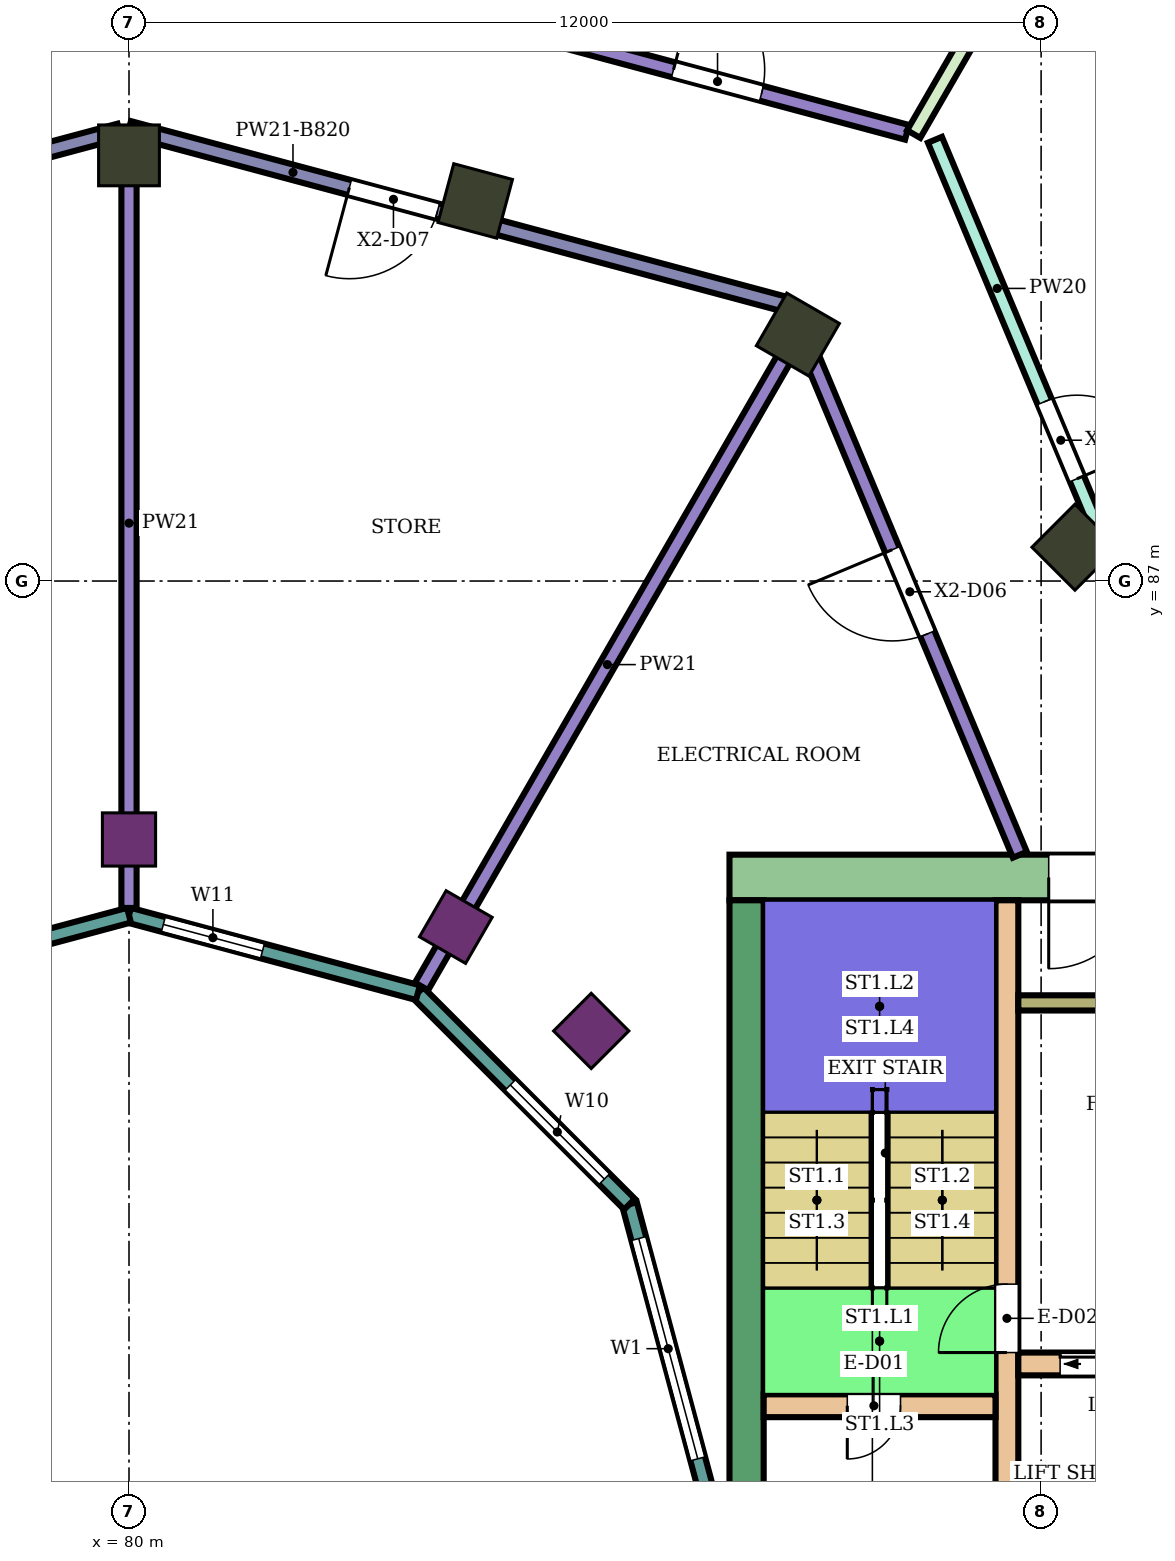
"""IFC4 building model, lengths in metres.
Left out: names, types, materials, properties, quantities, classifications, styles, units other than length and angle.
Written with IfcOpenShell. Run it as: python <this file> out.ifc"""

import sys

from ifc_helpers import new_model, si_unit, direction, frame, frame_2d, origin, origin_2d, place, context, subcontext, project, spatial, rectangle, extrude, element, fill, save


model = new_model("IFC4")
c1 = context("Model", 3, precision=1e-05, world=origin(), true_north=direction((0.0, 1.0)))
c2 = subcontext(c1, "Body", "Model", "MODEL_VIEW")
j1 = project(units=[si_unit("LENGTHUNIT", "METRE"), si_unit("PLANEANGLEUNIT", "RADIAN")], contexts=[c1])
p1 = place(None, origin())
s1 = spatial("IfcSite", under=j1, at=p1, CompositionType="ELEMENT")
p2 = place(p1, origin())
s2 = spatial("IfcBuilding", under=s1, at=p2, CompositionType="ELEMENT")
p3 = place(p2, frame((0.0, 0.0, 206.9)))
s3 = spatial("IfcBuildingStorey", under=s2, at=p3, CompositionType="ELEMENT", Elevation=206.9)
for number, where, z_axis, x_axis in (
    (1, (92.445, 87.445, 0.0), (0.0, 0.0, 1.0), (0.707, 0.707, 0.0)),
    (2, (88.8, 90.242, 0.0), (0.0, 0.0, 1.0), (0.5, 0.866, 0.0)),
    (3, (84.555, 92.0, 0.0), (0.0, 0.0, 1.0), (0.259, 0.966, 0.0)),
    (4, (80.0, 92.6, 0.0), (0.0, 0.0, 1.0), (0.0, 1.0, 0.0)),
):
    element("IfcColumn", number, at=place(p3, frame(where, z_axis=z_axis, x_axis=x_axis)), inside=s3, PredefinedType="COLUMN", context=c2, shape_type="SweptSolid", body=[
        extrude(rectangle(XDim=0.8, YDim=0.8, at=origin_2d()), origin(), (0.0, 0.0, 1.0), 5.6),
    ])
for number, where, z_axis, x_axis in (
    (5, (86.081, 81.081, 0.0), (0.0, 0.0, 1.0), (0.707, 0.707, 0.0)),
    (6, (84.3, 82.448, 0.0), (0.0, 0.0, 1.0), (0.5, 0.866, 0.0)),
    (7, (80.0, 83.6, 0.0), (0.0, 0.0, 1.0), (0.0, 1.0, 0.0)),
):
    element("IfcColumn", number, at=place(p3, frame(where, z_axis=z_axis, x_axis=x_axis)), inside=s3, PredefinedType="COLUMN", context=c2, shape_type="SweptSolid", body=[
        extrude(rectangle(XDim=0.7, YDim=0.7, at=origin_2d()), origin(), (0.0, 0.0, 1.0), 5.6),
    ])
p4 = place(p3, frame((87.9, 83.1, 0.0), z_axis=(0.0, 0.0, 1.0), x_axis=(1.0, 0.0, 0.0)))
e8 = element("IfcWall", 8, at=p4, inside=s3, PredefinedType="SHEAR", context=c2, shape_type="SweptSolid", body=[
    extrude(rectangle(XDim=14.9, YDim=0.6, at=frame_2d((7.45, 0.0))), origin(), (0.0, 0.0, 1.0), 5.28),
])
p5 = place(p4, frame((4.2, 0.0, 0.0)))
e9 = element("IfcOpeningElement", 9, at=p5, cuts=e8, PredefinedType="OPENING", context=c2, shape_type="SweptSolid", body=[
    extrude(rectangle(XDim=2.4, YDim=2.4, at=frame_2d((1.2, 1.2))), frame((0.0, 0.31, 0.0), z_axis=(0.0, -1.0, 0.0), x_axis=(1.0, 0.0, 0.0)), (0.0, 0.0, 1.0), 0.62),
])
p6 = place(p3, frame((88.125, 75.0, 0.0), z_axis=(0.0, 0.0, 1.0), x_axis=(0.0, 1.0, 0.0)))
e10 = element("IfcWall", 10, at=p6, inside=s3, PredefinedType="SHEAR", context=c2, shape_type="SweptSolid", body=[
    extrude(rectangle(XDim=7.8, YDim=0.45, at=frame_2d((3.9, 0.0))), origin(), (0.0, 0.0, 1.0), 5.28),
])
p7 = place(p3, frame((91.55, 75.0, 0.0), z_axis=(0.0, 0.0, 1.0), x_axis=(0.0, 1.0, 0.0)))
e11 = element("IfcWall", 11, at=p7, inside=s3, PredefinedType="SHEAR", context=c2, shape_type="SweptSolid", body=[
    extrude(rectangle(XDim=7.8, YDim=0.3, at=frame_2d((3.9, 0.0))), origin(), (0.0, 0.0, 1.0), 5.28),
])
p8 = place(p7, frame((1.85, 0.0, 0.0)))
e12 = element("IfcOpeningElement", 12, at=p8, cuts=e11, PredefinedType="OPENING", context=c2, shape_type="SweptSolid", body=[
    extrude(rectangle(XDim=0.9, YDim=2.1, at=frame_2d((0.45, 1.05))), frame((0.0, 0.16, 0.0), z_axis=(0.0, -1.0, 0.0), x_axis=(1.0, 0.0, 0.0)), (0.0, 0.0, 1.0), 0.32),
])
p9 = place(p3, frame((88.35, 76.15, 0.0), z_axis=(0.0, 0.0, 1.0), x_axis=(1.0, 0.0, 0.0)))
e13 = element("IfcWall", 13, at=p9, inside=s3, PredefinedType="SHEAR", context=c2, shape_type="SweptSolid", body=[
    extrude(rectangle(XDim=3.05, YDim=0.3, at=frame_2d((1.525, 0.0))), origin(), (0.0, 0.0, 1.0), 5.28),
])
p10 = place(p9, frame((1.1, 0.0, 0.0)))
e14 = element("IfcOpeningElement", 14, at=p10, cuts=e13, PredefinedType="OPENING", context=c2, shape_type="SweptSolid", body=[
    extrude(rectangle(XDim=0.7, YDim=2.0, at=frame_2d((0.35, 1.0))), frame((0.0, 0.16, 0.0), z_axis=(0.0, -1.0, 0.0), x_axis=(1.0, 0.0, 0.0)), (0.0, 0.0, 1.0), 0.32),
])
p11 = place(p3, frame((91.7, 76.7, 0.0), z_axis=(0.0, 0.0, 1.0), x_axis=(1.0, 0.0, 0.0)))
e15 = element("IfcWall", 15, at=p11, inside=s3, PredefinedType="SHEAR", context=c2, shape_type="SweptSolid", body=[
    extrude(rectangle(XDim=11.1, YDim=0.3, at=frame_2d((5.55, 0.0))), origin(), (0.0, 0.0, 1.0), 5.28),
])
p12 = place(p11, frame((0.55, 0.0, 0.0)))
e16 = element("IfcOpeningElement", 16, at=p12, cuts=e15, PredefinedType="OPENING", context=c2, shape_type="SweptSolid", body=[
    extrude(rectangle(XDim=1.1, YDim=2.1, at=frame_2d((0.55, 1.05))), frame((0.0, 0.16, 0.0), z_axis=(0.0, -1.0, 0.0), x_axis=(1.0, 0.0, 0.0)), (0.0, 0.0, 1.0), 0.32),
])
p13 = place(p11, frame((3.0, 0.0, 0.0)))
e17 = element("IfcOpeningElement", 17, at=p13, cuts=e15, PredefinedType="OPENING", context=c2, shape_type="SweptSolid", body=[
    extrude(rectangle(XDim=1.2, YDim=2.1, at=frame_2d((0.6, 1.05))), frame((0.0, 0.16, 0.0), z_axis=(0.0, -1.0, 0.0), x_axis=(1.0, 0.0, 0.0)), (0.0, 0.0, 1.0), 0.32),
])
p14 = place(p11, frame((5.5, 0.0, 0.0)))
e18 = element("IfcOpeningElement", 18, at=p14, cuts=e15, PredefinedType="OPENING", context=c2, shape_type="SweptSolid", body=[
    extrude(rectangle(XDim=1.2, YDim=2.1, at=frame_2d((0.6, 1.05))), frame((0.0, 0.16, 0.0), z_axis=(0.0, -1.0, 0.0), x_axis=(1.0, 0.0, 0.0)), (0.0, 0.0, 1.0), 0.32),
])
p15 = place(p11, frame((7.95, 0.0, 0.0)))
e19 = element("IfcOpeningElement", 19, at=p15, cuts=e15, PredefinedType="OPENING", context=c2, shape_type="SweptSolid", body=[
    extrude(rectangle(XDim=0.9, YDim=2.1, at=frame_2d((0.45, 1.05))), frame((0.0, 0.16, 0.0), z_axis=(0.0, -1.0, 0.0), x_axis=(1.0, 0.0, 0.0)), (0.0, 0.0, 1.0), 0.32),
])
p16 = place(p11, frame((9.75, 0.0, 0.0)))
e20 = element("IfcOpeningElement", 20, at=p16, cuts=e15, PredefinedType="OPENING", context=c2, shape_type="SweptSolid", body=[
    extrude(rectangle(XDim=0.9, YDim=2.1, at=frame_2d((0.45, 1.05))), frame((0.0, 0.16, 0.0), z_axis=(0.0, -1.0, 0.0), x_axis=(1.0, 0.0, 0.0)), (0.0, 0.0, 1.0), 0.32),
])
p17 = place(p3, frame((91.7, 81.45, 0.0), z_axis=(0.0, 0.0, 1.0), x_axis=(1.0, 0.0, 0.0)))
e21 = element("IfcWall", 21, at=p17, inside=s3, PredefinedType="SHEAR", context=c2, shape_type="SweptSolid", body=[
    extrude(rectangle(XDim=4.35, YDim=0.2, at=frame_2d((2.175, 0.0))), origin(), (0.0, 0.0, 1.0), 5.28),
])
p18 = place(p3, frame((87.604, 75.0, 0.0), z_axis=(0.0, 0.0, 1.0), x_axis=(-0.258789828301, 0.965933654434, 0.0)))
e22 = element("IfcWall", 22, at=p18, inside=s3, PredefinedType="NOTDEFINED", context=c2, shape_type="SweptSolid", body=[
    extrude(rectangle(XDim=3.936, YDim=0.2, at=frame_2d((1.968, 0.0))), origin(), (0.0, 0.0, 1.0), 5.6),
])
p19 = place(p18, frame((0.468, 0.0, 0.9)))
e23 = element("IfcOpeningElement", 23, at=p19, cuts=e22, PredefinedType="OPENING", context=c2, shape_type="SweptSolid", body=[
    extrude(rectangle(XDim=3.0, YDim=2.3, at=frame_2d((1.5, 1.15))), frame((0.0, 0.11, 0.0), z_axis=(0.0, -1.0, 0.0), x_axis=(1.0, 0.0, 0.0)), (0.0, 0.0, 1.0), 0.22),
])
p20 = place(p3, frame((86.585, 78.802, 0.0), z_axis=(0.0, 0.0, 1.0), x_axis=(-0.707106781187, 0.707106781187, 0.0)))
e24 = element("IfcWall", 24, at=p20, inside=s3, PredefinedType="NOTDEFINED", context=c2, shape_type="SweptSolid", body=[
    extrude(rectangle(XDim=3.936, YDim=0.2, at=frame_2d((1.968, 0.0))), origin(), (0.0, 0.0, 1.0), 5.6),
])
p21 = place(p20, frame((0.468, 0.0, 0.9)))
e25 = element("IfcOpeningElement", 25, at=p21, cuts=e24, PredefinedType="OPENING", context=c2, shape_type="SweptSolid", body=[
    extrude(rectangle(XDim=1.75, YDim=2.3, at=frame_2d((0.875, 1.15))), frame((0.0, 0.11, 0.0), z_axis=(0.0, -1.0, 0.0), x_axis=(1.0, 0.0, 0.0)), (0.0, 0.0, 1.0), 0.22),
])
p22 = place(p3, frame((83.802, 81.585, 0.0), z_axis=(0.0, 0.0, 1.0), x_axis=(-0.965933654434, 0.258789828301, 0.0)))
e26 = element("IfcWall", 26, at=p22, inside=s3, PredefinedType="NOTDEFINED", context=c2, shape_type="SweptSolid", body=[
    extrude(rectangle(XDim=3.936, YDim=0.2, at=frame_2d((1.968, 0.0))), origin(), (0.0, 0.0, 1.0), 5.6),
])
p23 = place(p22, frame((2.118, 0.0, 0.9)))
e27 = element("IfcOpeningElement", 27, at=p23, cuts=e26, PredefinedType="OPENING", context=c2, shape_type="SweptSolid", body=[
    extrude(rectangle(XDim=1.35, YDim=2.3, at=frame_2d((0.675, 1.15))), frame((0.0, 0.11, 0.0), z_axis=(0.0, -1.0, 0.0), x_axis=(1.0, 0.0, 0.0)), (0.0, 0.0, 1.0), 0.22),
])
p24 = place(p3, frame((80.0, 82.604, 0.0), z_axis=(0.0, 0.0, 1.0), x_axis=(-0.965933654434, -0.258789828301, 0.0)))
e28 = element("IfcWall", 28, at=p24, inside=s3, PredefinedType="NOTDEFINED", context=c2, shape_type="SweptSolid", body=[
    extrude(rectangle(XDim=3.936, YDim=0.2, at=frame_2d((1.968, 0.0))), origin(), (0.0, 0.0, 1.0), 5.6),
])
p25 = place(p24, frame((2.118, 0.0, 0.9)))
e29 = element("IfcOpeningElement", 29, at=p25, cuts=e28, PredefinedType="OPENING", context=c2, shape_type="SweptSolid", body=[
    extrude(rectangle(XDim=1.35, YDim=2.3, at=frame_2d((0.675, 1.15))), frame((0.0, 0.11, 0.0), z_axis=(0.0, -1.0, 0.0), x_axis=(1.0, 0.0, 0.0)), (0.0, 0.0, 1.0), 0.22),
])
p26 = place(p3, frame((69.397, 92.805, 0.0), z_axis=(0.0, 0.0, 1.0), x_axis=(0.965949547217, 0.258730501163, 0.0)))
e30 = element("IfcWall", 30, at=p26, inside=s3, PredefinedType="PARTITIONING", context=c2, shape_type="SweptSolid", body=[
    extrude(rectangle(XDim=10.927, YDim=0.2, at=frame_2d((5.463, 0.0))), origin(), (0.0, 0.0, 1.0), 5.15),
])
p27 = place(p26, frame((5.023, 0.0, 0.0)))
e31 = element("IfcOpeningElement", 31, at=p27, cuts=e30, PredefinedType="OPENING", context=c2, shape_type="SweptSolid", body=[
    extrude(rectangle(XDim=1.2, YDim=2.4, at=frame_2d((0.6, 1.2))), frame((0.0, 0.11, 0.0), z_axis=(0.0, -1.0, 0.0), x_axis=(1.0, 0.0, 0.0)), (0.0, 0.0, 1.0), 0.22),
])
p28 = place(p3, frame((71.303, 90.624, 0.0), z_axis=(0.0, 0.0, 1.0), x_axis=(0.965935648904, 0.258782383822, 0.0)))
e32 = element("IfcWall", 32, at=p28, inside=s3, PredefinedType="PARTITIONING", context=c2, shape_type="SweptSolid", body=[
    extrude(rectangle(XDim=8.874, YDim=0.2, at=frame_2d((4.437, 0.0))), origin(), (0.0, 0.0, 1.0), 4.78),
])
p29 = place(p28, frame((4.802, 0.0, 0.0)))
e33 = element("IfcOpeningElement", 33, at=p29, cuts=e32, PredefinedType="OPENING", context=c2, shape_type="SweptSolid", body=[
    extrude(rectangle(XDim=1.2, YDim=2.4, at=frame_2d((0.6, 1.2))), frame((0.0, 0.11, 0.0), z_axis=(0.0, -1.0, 0.0), x_axis=(1.0, 0.0, 0.0)), (0.0, 0.0, 1.0), 0.22),
])
p30 = place(p3, frame((80.0, 82.699, 0.0), z_axis=(0.0, 0.0, 1.0), x_axis=(0.0, 1.0, 0.0)))
e34 = element("IfcWall", 34, at=p30, inside=s3, PredefinedType="PARTITIONING", context=c2, shape_type="SweptSolid", body=[
    extrude(rectangle(XDim=10.125, YDim=0.2, at=frame_2d((5.062, 0.0))), origin(), (0.0, 0.0, 1.0), 5.15),
])
p31 = place(p3, frame((80.0, 92.954, 0.0), z_axis=(0.0, 0.0, 1.0), x_axis=(0.965932194462, -0.258795277586, 0.0)))
e35 = element("IfcWall", 35, at=p31, inside=s3, PredefinedType="PARTITIONING", context=c2, shape_type="SweptSolid", body=[
    extrude(rectangle(XDim=8.934, YDim=0.2, at=frame_2d((4.467, 0.0))), origin(), (0.0, 0.0, 1.0), 4.78),
])
p32 = place(p31, frame((3.002, 0.0, 0.0)))
e36 = element("IfcOpeningElement", 36, at=p32, cuts=e35, PredefinedType="OPENING", context=c2, shape_type="SweptSolid", body=[
    extrude(rectangle(XDim=1.2, YDim=2.4, at=frame_2d((0.6, 1.2))), frame((0.0, 0.11, 0.0), z_axis=(0.0, -1.0, 0.0), x_axis=(1.0, 0.0, 0.0)), (0.0, 0.0, 1.0), 0.22),
])
p33 = place(p3, frame((80.0, 95.646, 0.0), z_axis=(0.0, 0.0, 1.0), x_axis=(0.965926044247, -0.258818231672, 0.0)))
e37 = element("IfcWall", 37, at=p33, inside=s3, PredefinedType="PARTITIONING", context=c2, shape_type="SweptSolid", body=[
    extrude(rectangle(XDim=10.597, YDim=0.2, at=frame_2d((5.298, 0.0))), origin(), (0.0, 0.0, 1.0), 5.15),
])
p34 = place(p33, frame((7.416, 0.0, 0.0)))
e38 = element("IfcOpeningElement", 38, at=p34, cuts=e37, PredefinedType="OPENING", context=c2, shape_type="SweptSolid", body=[
    extrude(rectangle(XDim=1.2, YDim=2.4, at=frame_2d((0.6, 1.2))), frame((0.0, 0.11, 0.0), z_axis=(0.0, -1.0, 0.0), x_axis=(1.0, 0.0, 0.0)), (0.0, 0.0, 1.0), 0.22),
])
p35 = place(p3, frame((83.849, 81.667, 0.0), z_axis=(0.0, 0.0, 1.0), x_axis=(0.500043783105, 0.866000124121, 0.0)))
e39 = element("IfcWall", 39, at=p35, inside=s3, PredefinedType="PARTITIONING", context=c2, shape_type="SweptSolid", body=[
    extrude(rectangle(XDim=9.777, YDim=0.2, at=frame_2d((4.889, 0.0))), origin(), (0.0, 0.0, 1.0), 5.15),
])
p36 = place(p3, frame((88.697, 90.624, 0.0), z_axis=(0.0, 0.0, 1.0), x_axis=(0.386027055918, -0.922487459047, 0.0)))
e40 = element("IfcWall", 40, at=p36, inside=s3, PredefinedType="PARTITIONING", context=c2, shape_type="SweptSolid", body=[
    extrude(rectangle(XDim=7.832, YDim=0.2, at=frame_2d((3.916, 0.0))), origin(), (0.0, 0.0, 1.0), 5.15),
])
p37 = place(p36, frame((3.482, 0.0, 0.0)))
e41 = element("IfcOpeningElement", 41, at=p37, cuts=e40, PredefinedType="OPENING", context=c2, shape_type="SweptSolid", body=[
    extrude(rectangle(XDim=1.2, YDim=2.4, at=frame_2d((0.6, 1.2))), frame((0.0, 0.11, 0.0), z_axis=(0.0, -1.0, 0.0), x_axis=(1.0, 0.0, 0.0)), (0.0, 0.0, 1.0), 0.22),
])
p38 = place(p3, frame((90.323, 92.88, 0.0), z_axis=(0.0, 0.0, 1.0), x_axis=(0.500028816268, 0.866008766065, 0.0)))
e42 = element("IfcWall", 42, at=p38, inside=s3, PredefinedType="PARTITIONING", context=c2, shape_type="SweptSolid", body=[
    extrude(rectangle(XDim=5.151, YDim=0.2, at=frame_2d((2.575, 0.0))), origin(), (0.0, 0.0, 1.0), 4.667),
])
p39 = place(p3, frame((90.603, 92.805, 0.0), z_axis=(0.0, 0.0, 1.0), x_axis=(0.386317530854, -0.922365852227, 0.0)))
e43 = element("IfcWall", 43, at=p39, inside=s3, PredefinedType="PARTITIONING", context=c2, shape_type="SweptSolid", body=[
    extrude(rectangle(XDim=8.48, YDim=0.2, at=frame_2d((4.24, 0.0))), origin(), (0.0, 0.0, 1.0), 5.15),
])
p40 = place(p39, frame((3.735, 0.0, 0.0)))
e44 = element("IfcOpeningElement", 44, at=p40, cuts=e43, PredefinedType="OPENING", context=c2, shape_type="SweptSolid", body=[
    extrude(rectangle(XDim=1.1, YDim=2.1, at=frame_2d((0.55, 1.05))), frame((0.0, 0.11, 0.0), z_axis=(0.0, -1.0, 0.0), x_axis=(1.0, 0.0, 0.0)), (0.0, 0.0, 1.0), 0.22),
])
p41 = place(p19, origin())
e45 = element("IfcWindow", 45, at=p41, inside=s3, PartitioningType="SINGLE_PANEL", PredefinedType="WINDOW", context=c2, shape_type="SweptSolid", body=[
    extrude(rectangle(XDim=3.0, YDim=2.3, at=frame_2d((1.5, 1.15))), frame((0.0, 0.03, 0.0), z_axis=(0.0, -1.0, 0.0), x_axis=(1.0, 0.0, 0.0)), (0.0, 0.0, 1.0), 0.06),
])
fill(e23, e45)
p42 = place(p21, origin())
e46 = element("IfcWindow", 46, at=p42, inside=s3, PartitioningType="SINGLE_PANEL", PredefinedType="WINDOW", context=c2, shape_type="SweptSolid", body=[
    extrude(rectangle(XDim=1.75, YDim=2.3, at=frame_2d((0.875, 1.15))), frame((0.0, 0.03, 0.0), z_axis=(0.0, -1.0, 0.0), x_axis=(1.0, 0.0, 0.0)), (0.0, 0.0, 1.0), 0.06),
])
fill(e25, e46)
p43 = place(p23, origin())
e47 = element("IfcWindow", 47, at=p43, inside=s3, PartitioningType="SINGLE_PANEL", PredefinedType="WINDOW", context=c2, shape_type="SweptSolid", body=[
    extrude(rectangle(XDim=1.35, YDim=2.3, at=frame_2d((0.675, 1.15))), frame((0.0, 0.03, 0.0), z_axis=(0.0, -1.0, 0.0), x_axis=(1.0, 0.0, 0.0)), (0.0, 0.0, 1.0), 0.06),
])
fill(e27, e47)
p44 = place(p40, origin())
e48 = element("IfcDoor", 48, at=p44, inside=s3, OperationType="SINGLE_SWING_RIGHT", PredefinedType="DOOR", context=c2, shape_type="SweptSolid", body=[
    extrude(rectangle(XDim=1.1, YDim=2.1, at=frame_2d((0.55, 1.05))), frame((0.0, 0.025, 0.0), z_axis=(0.0, -1.0, 0.0), x_axis=(1.0, 0.0, 0.0)), (0.0, 0.0, 1.0), 0.05),
])
fill(e44, e48)
p45 = place(p34, origin())
e49 = element("IfcDoor", 49, at=p45, inside=s3, OperationType="SINGLE_SWING_LEFT", PredefinedType="DOOR", context=c2, shape_type="SweptSolid", body=[
    extrude(rectangle(XDim=1.2, YDim=2.4, at=frame_2d((0.6, 1.2))), frame((0.0, 0.025, 0.0), z_axis=(0.0, -1.0, 0.0), x_axis=(1.0, 0.0, 0.0)), (0.0, 0.0, 1.0), 0.05),
])
fill(e38, e49)
p46 = place(p37, frame((1.2, 0.0, 0.0), z_axis=(0.0, 0.0, 1.0), x_axis=(-1.0, 0.0, 0.0)))
e50 = element("IfcDoor", 50, at=p46, inside=s3, OperationType="SINGLE_SWING_RIGHT", PredefinedType="DOOR", context=c2, shape_type="SweptSolid", body=[
    extrude(rectangle(XDim=1.2, YDim=2.4, at=frame_2d((0.6, 1.2))), frame((0.0, 0.025, 0.0), z_axis=(0.0, -1.0, 0.0), x_axis=(1.0, 0.0, 0.0)), (0.0, 0.0, 1.0), 0.05),
])
fill(e41, e50)
p47 = place(p32, frame((1.2, 0.0, 0.0), z_axis=(0.0, 0.0, 1.0), x_axis=(-1.0, 0.0, 0.0)))
e51 = element("IfcDoor", 51, at=p47, inside=s3, OperationType="SINGLE_SWING_RIGHT", PredefinedType="DOOR", context=c2, shape_type="SweptSolid", body=[
    extrude(rectangle(XDim=1.2, YDim=2.4, at=frame_2d((0.6, 1.2))), frame((0.0, 0.025, 0.0), z_axis=(0.0, -1.0, 0.0), x_axis=(1.0, 0.0, 0.0)), (0.0, 0.0, 1.0), 0.05),
])
fill(e36, e51)
p48 = place(p10, frame((0.7, 0.0, 0.0), z_axis=(0.0, 0.0, 1.0), x_axis=(-1.0, 0.0, 0.0)))
e52 = element("IfcDoor", 52, at=p48, inside=s3, OperationType="SINGLE_SWING_RIGHT", PredefinedType="DOOR", context=c2, shape_type="SweptSolid", body=[
    extrude(rectangle(XDim=0.7, YDim=2.0, at=frame_2d((0.35, 1.0))), frame((0.0, 0.025, 0.0), z_axis=(0.0, -1.0, 0.0), x_axis=(1.0, 0.0, 0.0)), (0.0, 0.0, 1.0), 0.05),
])
fill(e14, e52)
p49 = place(p8, origin())
e53 = element("IfcDoor", 53, at=p49, inside=s3, OperationType="SINGLE_SWING_LEFT", PredefinedType="DOOR", context=c2, shape_type="SweptSolid", body=[
    extrude(rectangle(XDim=0.9, YDim=2.1, at=frame_2d((0.45, 1.05))), frame((0.0, 0.025, 0.0), z_axis=(0.0, -1.0, 0.0), x_axis=(1.0, 0.0, 0.0)), (0.0, 0.0, 1.0), 0.05),
])
fill(e12, e53)
p50 = place(p12, origin())
e54 = element("IfcDoor", 54, at=p50, inside=s3, OperationType="DOUBLE_DOOR_SLIDING", PredefinedType="DOOR", context=c2, shape_type="SweptSolid", body=[
    extrude(rectangle(XDim=1.1, YDim=2.1, at=frame_2d((0.55, 1.05))), frame((0.0, 0.025, 0.0), z_axis=(0.0, -1.0, 0.0), x_axis=(1.0, 0.0, 0.0)), (0.0, 0.0, 1.0), 0.05),
])
fill(e16, e54)
p51 = place(p5, frame((2.4, 0.0, 0.0), z_axis=(0.0, 0.0, 1.0), x_axis=(-1.0, 0.0, 0.0)))
e55 = element("IfcDoor", 55, at=p51, inside=s3, OperationType="DOUBLE_DOOR_SINGLE_SWING", PredefinedType="DOOR", context=c2, shape_type="SweptSolid", body=[
    extrude(rectangle(XDim=2.4, YDim=2.4, at=frame_2d((1.2, 1.2))), frame((0.0, 0.025, 0.0), z_axis=(0.0, -1.0, 0.0), x_axis=(1.0, 0.0, 0.0)), (0.0, 0.0, 1.0), 0.05),
])
fill(e9, e55)
save(model, sys.argv[1])
